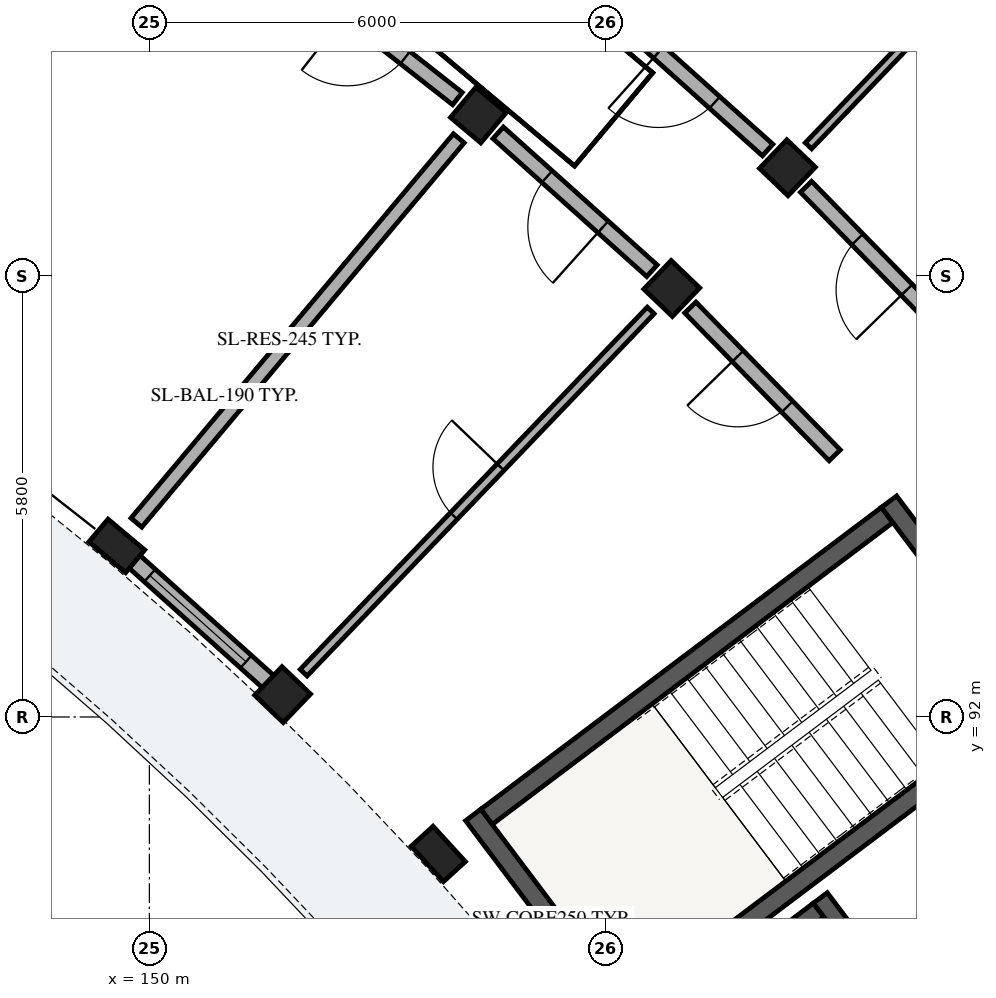
"""IFC4 building model, lengths in metres.
Left out: names, types, materials, properties, quantities, classifications, styles, units other than length and angle.
Written with IfcOpenShell. Run it as: python <this file> out.ifc"""

import sys

from ifc_helpers import new_model, si_unit, direction, frame, frame_2d, origin, origin_2d, place, context, subcontext, project, spatial, rectangle, extrude, element, fill, save


model = new_model("IFC4")
c1 = context("Model", 3, precision=1e-05, world=origin(), true_north=direction((0.0, 1.0)))
c2 = subcontext(c1, "Body", "Model", "MODEL_VIEW")
j1 = project(units=[si_unit("LENGTHUNIT", "METRE"), si_unit("PLANEANGLEUNIT", "RADIAN")], contexts=[c1])
p1 = place(None, origin())
s1 = spatial("IfcSite", under=j1, at=p1, CompositionType="ELEMENT")
p2 = place(p1, origin())
s2 = spatial("IfcBuilding", under=s1, at=p2, CompositionType="ELEMENT")
p3 = place(p2, frame((0.0, 0.0, 39.08)))
s3 = spatial("IfcBuildingStorey", under=s2, at=p3, CompositionType="ELEMENT", Elevation=39.08)
p4 = place(p3, frame((159.707, 94.658, 0.0), z_axis=(0.0, 0.0, 1.0), x_axis=(-0.798639633744, -0.601809550782, 0.0)))
e1 = element("IfcWall", 1, at=p4, inside=s3, PredefinedType="SHEAR", context=c2, shape_type="SweptSolid", body=[
    extrude(rectangle(XDim=6.6, YDim=0.25, at=frame_2d((3.3, 0.0))), origin(), (0.0, 0.0, 1.0), 3.11),
])
p5 = place(p3, frame((154.261, 90.711, 0.0), z_axis=(0.0, 0.0, 1.0), x_axis=(0.601825826579, -0.798627368967, 0.0)))
e2 = element("IfcWall", 2, at=p5, inside=s3, PredefinedType="SHEAR", context=c2, shape_type="SweptSolid", body=[
    extrude(rectangle(XDim=3.42, YDim=0.25, at=frame_2d((1.71, 0.0))), origin(), (0.0, 0.0, 1.0), 3.11),
])
p6 = place(p3, frame((159.731, 94.833, 0.0), z_axis=(0.0, 0.0, 1.0), x_axis=(0.601814606132, -0.798635824294, 0.0)))
e3 = element("IfcWall", 3, at=p6, inside=s3, PredefinedType="SHEAR", context=c2, shape_type="SweptSolid", body=[
    extrude(rectangle(XDim=3.42, YDim=0.25, at=frame_2d((1.71, 0.0))), origin(), (0.0, 0.0, 1.0), 3.11),
])
p7 = place(p3, frame((161.615, 92.126, 0.0), z_axis=(0.0, 0.0, 1.0), x_axis=(-0.798639633744, -0.601809550782, 0.0)))
e4 = element("IfcWall", 4, at=p7, inside=s3, PredefinedType="SHEAR", context=c2, shape_type="SweptSolid", body=[
    extrude(rectangle(XDim=6.6, YDim=0.25, at=frame_2d((3.3, 0.0))), origin(), (0.0, 0.0, 1.0), 3.11),
])
p8 = place(p7, frame((0.22, 0.0, 0.0)))
e5 = element("IfcOpeningElement", 5, at=p8, cuts=e4, PredefinedType="OPENING", context=c2, shape_type="SweptSolid", body=[
    extrude(rectangle(XDim=1.05, YDim=2.15, at=frame_2d((0.525, 1.075))), frame((0.0, 0.135, 0.0), z_axis=(0.0, -1.0, 0.0), x_axis=(1.0, 0.0, 0.0)), (0.0, 0.0, 1.0), 0.27),
])
p9 = place(p3, frame((158.827, 89.619, 0.0), z_axis=(0.0, 0.0, 1.0), x_axis=(0.601819781152, -0.798631924615, 0.0)))
e6 = element("IfcWall", 6, at=p9, inside=s3, PredefinedType="SHEAR", context=c2, shape_type="SweptSolid", body=[
    extrude(rectangle(XDim=3.26, YDim=0.23, at=frame_2d((1.63, 0.0))), origin(), (0.0, 0.0, 1.0), 3.11),
])
p10 = place(p9, frame((0.9, 0.0, 0.0)))
e7 = element("IfcOpeningElement", 7, at=p10, cuts=e6, PredefinedType="OPENING", context=c2, shape_type="SweptSolid", body=[
    extrude(rectangle(XDim=1.1, YDim=2.15, at=frame_2d((0.55, 1.075))), frame((0.0, 0.125, 0.0), z_axis=(0.0, -1.0, 0.0), x_axis=(1.0, 0.0, 0.0)), (0.0, 0.0, 1.0), 0.25),
])
p11 = place(p3, frame((158.805, 89.458, 0.0), z_axis=(0.0, 0.0, 1.0), x_axis=(-0.798608971494, -0.601850239387, 0.0)))
e8 = element("IfcWall", 8, at=p11, inside=s3, PredefinedType="SHEAR", context=c2, shape_type="SweptSolid", body=[
    extrude(rectangle(XDim=2.7, YDim=0.23, at=frame_2d((1.35, 0.0))), origin(), (0.0, 0.0, 1.0), 3.11),
])
p12 = place(p3, frame((153.801, 90.198, 0.0), z_axis=(0.0, 0.0, 1.0), x_axis=(0.73793204255, 0.674875025896, 0.0)))
e9 = element("IfcColumn", 9, at=p12, inside=s3, PredefinedType="PILASTER", context=c2, shape_type="SweptSolid", body=[
    extrude(rectangle(XDim=0.39, YDim=0.63, at=origin_2d()), origin(), (0.0, 0.0, 1.0), 3.12),
])
for number, where, z_axis, x_axis in (
    (10, (151.753, 92.294, 0.0), (0.0, 0.0, 1.0), (0.692, 0.722, 0.0)),
    (11, (156.873, 97.637, 0.0), (0.0, 0.0, 1.0), (0.692, 0.722, 0.0)),
    (12, (158.395, 99.226, 0.0), (0.0, 0.0, 1.0), (0.692, 0.722, 0.0)),
):
    element("IfcColumn", number, at=place(p3, frame(where, z_axis=z_axis, x_axis=x_axis)), inside=s3, PredefinedType="COLUMN", context=c2, shape_type="SweptSolid", body=[
        extrude(rectangle(XDim=0.52, YDim=0.52, at=origin_2d()), origin(), (0.0, 0.0, 1.0), 3.12),
    ])
p13 = place(p3, frame((149.572, 94.251, 0.0), z_axis=(0.0, 0.0, 1.0), x_axis=(0.642787582947, 0.766044465556, 0.0)))
e13 = element("IfcColumn", 13, at=p13, inside=s3, PredefinedType="PILASTER", context=c2, shape_type="SweptSolid", body=[
    extrude(rectangle(XDim=0.39, YDim=0.63, at=origin_2d()), origin(), (0.0, 0.0, 1.0), 3.12),
])
p14 = place(p3, frame((154.329, 99.919, 0.0), z_axis=(0.0, 0.0, 1.0), x_axis=(0.642787582947, 0.766044465556, 0.0)))
e14 = element("IfcColumn", 14, at=p14, inside=s3, PredefinedType="COLUMN", context=c2, shape_type="SweptSolid", body=[
    extrude(rectangle(XDim=0.52, YDim=0.52, at=origin_2d()), origin(), (0.0, 0.0, 1.0), 3.12),
])
p15 = place(p3, frame((151.582, 92.448, 0.0), z_axis=(0.0, 0.0, 1.0), x_axis=(-0.744394463736, 0.667740130859, 0.0)))
e15 = element("IfcWall", 15, at=p15, inside=s3, PredefinedType="SOLIDWALL", context=c2, shape_type="SweptSolid", body=[
    extrude(rectangle(XDim=2.535, YDim=0.22, at=frame_2d((1.268, 0.0))), origin(), (0.0, 0.0, 1.0), 2.355),
])
p16 = place(p15, frame((0.417, 0.0, 0.35)))
e16 = element("IfcOpeningElement", 16, at=p16, cuts=e15, PredefinedType="OPENING", context=c2, shape_type="SweptSolid", body=[
    extrude(rectangle(XDim=1.7, YDim=1.8, at=frame_2d((0.85, 0.9))), frame((0.0, 0.12, 0.0), z_axis=(0.0, -1.0, 0.0), x_axis=(1.0, 0.0, 0.0)), (0.0, 0.0, 1.0), 0.24),
])
p17 = place(p3, frame((160.641, 96.927, 0.0), z_axis=(0.0, 0.0, 1.0), x_axis=(-0.698787219683, 0.715329589496, 0.0)))
e17 = element("IfcWall", 17, at=p17, inside=s3, PredefinedType="PARTITIONING", context=c2, shape_type="SweptSolid", body=[
    extrude(rectangle(XDim=2.863, YDim=0.205, at=frame_2d((1.432, 0.0))), origin(), (0.0, 0.0, 1.0), 2.37),
])
p18 = place(p17, frame((0.967, 0.0, 0.0)))
e18 = element("IfcOpeningElement", 18, at=p18, cuts=e17, PredefinedType="OPENING", context=c2, shape_type="SweptSolid", body=[
    extrude(rectangle(XDim=0.93, YDim=2.12, at=frame_2d((0.465, 1.06))), frame((0.0, 0.113, 0.0), z_axis=(0.0, -1.0, 0.0), x_axis=(1.0, 0.0, 0.0)), (0.0, 0.0, 1.0), 0.225),
])
p19 = place(p3, frame((159.017, 95.443, 0.0), z_axis=(0.0, 0.0, 1.0), x_axis=(-0.698840007829, 0.715278018296, 0.0)))
e19 = element("IfcWall", 19, at=p19, inside=s3, PredefinedType="PARTITIONING", context=c2, shape_type="SweptSolid", body=[
    extrude(rectangle(XDim=2.718, YDim=0.205, at=frame_2d((1.359, 0.0))), origin(), (0.0, 0.0, 1.0), 2.37),
])
p20 = place(p19, frame((0.894, 0.0, 0.0)))
e20 = element("IfcOpeningElement", 20, at=p20, cuts=e19, PredefinedType="OPENING", context=c2, shape_type="SweptSolid", body=[
    extrude(rectangle(XDim=0.93, YDim=2.12, at=frame_2d((0.465, 1.06))), frame((0.0, 0.113, 0.0), z_axis=(0.0, -1.0, 0.0), x_axis=(1.0, 0.0, 0.0)), (0.0, 0.0, 1.0), 0.225),
])
p21 = place(p3, frame((158.672, 99.514, 0.0), z_axis=(0.0, 0.0, 1.0), x_axis=(0.691855720025, 0.722035776585, 0.0)))
e21 = element("IfcWall", 21, at=p21, inside=s3, PredefinedType="PARTITIONING", context=c2, shape_type="SweptSolid", body=[
    extrude(rectangle(XDim=4.7, YDim=0.115, at=frame_2d((2.35, 0.0))), origin(), (0.0, 0.0, 1.0), 2.37),
])
p22 = place(p21, frame((1.895, 0.0, 0.0)))
e22 = element("IfcOpeningElement", 22, at=p22, cuts=e21, PredefinedType="OPENING", context=c2, shape_type="SweptSolid", body=[
    extrude(rectangle(XDim=0.91, YDim=2.1, at=frame_2d((0.455, 1.05))), frame((0.0, 0.067, 0.0), z_axis=(0.0, -1.0, 0.0), x_axis=(1.0, 0.0, 0.0)), (0.0, 0.0, 1.0), 0.135),
])
p23 = place(p3, frame((152.03, 92.583, 0.0), z_axis=(0.0, 0.0, 1.0), x_axis=(0.691872422458, 0.722019771919, 0.0)))
e23 = element("IfcWall", 23, at=p23, inside=s3, PredefinedType="PARTITIONING", context=c2, shape_type="SweptSolid", body=[
    extrude(rectangle(XDim=6.6, YDim=0.125, at=frame_2d((3.3, 0.0))), origin(), (0.0, 0.0, 1.0), 2.37),
])
p24 = place(p23, frame((2.855, 0.0, 0.0)))
e24 = element("IfcOpeningElement", 24, at=p24, cuts=e23, PredefinedType="OPENING", context=c2, shape_type="SweptSolid", body=[
    extrude(rectangle(XDim=0.89, YDim=2.1, at=frame_2d((0.445, 1.05))), frame((0.0, 0.073, 0.0), z_axis=(0.0, -1.0, 0.0), x_axis=(1.0, 0.0, 0.0)), (0.0, 0.0, 1.0), 0.145),
])
p25 = place(p3, frame((158.135, 99.459, 0.0), z_axis=(0.0, 0.0, 1.0), x_axis=(-0.744433521088, 0.667696587291, 0.0)))
e25 = element("IfcWall", 25, at=p25, inside=s3, PredefinedType="PARTITIONING", context=c2, shape_type="SweptSolid", body=[
    extrude(rectangle(XDim=2.863, YDim=0.205, at=frame_2d((1.432, 0.0))), origin(), (0.0, 0.0, 1.0), 2.37),
])
p26 = place(p25, frame((0.937, 0.0, 0.0)))
e26 = element("IfcOpeningElement", 26, at=p26, cuts=e25, PredefinedType="OPENING", context=c2, shape_type="SweptSolid", body=[
    extrude(rectangle(XDim=0.99, YDim=2.16, at=frame_2d((0.495, 1.08))), frame((0.0, 0.113, 0.0), z_axis=(0.0, -1.0, 0.0), x_axis=(1.0, 0.0, 0.0)), (0.0, 0.0, 1.0), 0.225),
])
p27 = place(p3, frame((156.613, 97.871, 0.0), z_axis=(0.0, 0.0, 1.0), x_axis=(-0.744418559135, 0.667713268413, 0.0)))
e27 = element("IfcWall", 27, at=p27, inside=s3, PredefinedType="PARTITIONING", context=c2, shape_type="SweptSolid", body=[
    extrude(rectangle(XDim=2.718, YDim=0.205, at=frame_2d((1.359, 0.0))), origin(), (0.0, 0.0, 1.0), 2.37),
])
p28 = place(p27, frame((0.864, 0.0, 0.0)))
e28 = element("IfcOpeningElement", 28, at=p28, cuts=e27, PredefinedType="OPENING", context=c2, shape_type="SweptSolid", body=[
    extrude(rectangle(XDim=0.99, YDim=2.16, at=frame_2d((0.495, 1.08))), frame((0.0, 0.113, 0.0), z_axis=(0.0, -1.0, 0.0), x_axis=(1.0, 0.0, 0.0)), (0.0, 0.0, 1.0), 0.225),
])
p29 = place(p3, frame((149.829, 94.557, 0.0), z_axis=(0.0, 0.0, 1.0), x_axis=(0.642789470807, 0.766042881449, 0.0)))
e29 = element("IfcWall", 29, at=p29, inside=s3, PredefinedType="PARTITIONING", context=c2, shape_type="SweptSolid", body=[
    extrude(rectangle(XDim=6.6, YDim=0.185, at=frame_2d((3.3, 0.0))), origin(), (0.0, 0.0, 1.0), 2.37),
])
p30 = place(p3, frame((154.053, 100.135, 0.0), z_axis=(0.0, 0.0, 1.0), x_axis=(-0.786835457019, 0.617162833924, 0.0)))
e30 = element("IfcWall", 30, at=p30, inside=s3, PredefinedType="PARTITIONING", context=c2, shape_type="SweptSolid", body=[
    extrude(rectangle(XDim=2.718, YDim=0.205, at=frame_2d((1.359, 0.0))), origin(), (0.0, 0.0, 1.0), 2.37),
])
p31 = place(p30, frame((0.874, 0.0, 0.0)))
e31 = element("IfcOpeningElement", 31, at=p31, cuts=e30, PredefinedType="OPENING", context=c2, shape_type="SweptSolid", body=[
    extrude(rectangle(XDim=0.97, YDim=2.15, at=frame_2d((0.485, 1.075))), frame((0.0, 0.113, 0.0), z_axis=(0.0, -1.0, 0.0), x_axis=(1.0, 0.0, 0.0)), (0.0, 0.0, 1.0), 0.225),
])
p32 = place(p16, origin())
e32 = element("IfcWindow", 32, at=p32, inside=s3, PartitioningType="SINGLE_PANEL", PredefinedType="WINDOW", context=c2, shape_type="SweptSolid", body=[
    extrude(rectangle(XDim=1.7, YDim=1.8, at=frame_2d((0.85, 0.9))), frame((0.0, 0.03, 0.0), z_axis=(0.0, -1.0, 0.0), x_axis=(1.0, 0.0, 0.0)), (0.0, 0.0, 1.0), 0.06),
])
fill(e16, e32)
p33 = place(p18, origin())
e33 = element("IfcDoor", 33, at=p33, inside=s3, OperationType="SINGLE_SWING_LEFT", PredefinedType="DOOR", context=c2, shape_type="SweptSolid", body=[
    extrude(rectangle(XDim=0.93, YDim=2.12, at=frame_2d((0.465, 1.06))), frame((0.0, 0.025, 0.0), z_axis=(0.0, -1.0, 0.0), x_axis=(1.0, 0.0, 0.0)), (0.0, 0.0, 1.0), 0.05),
])
fill(e18, e33)
p34 = place(p20, origin())
e34 = element("IfcDoor", 34, at=p34, inside=s3, OperationType="SINGLE_SWING_RIGHT", PredefinedType="DOOR", context=c2, shape_type="SweptSolid", body=[
    extrude(rectangle(XDim=0.93, YDim=2.12, at=frame_2d((0.465, 1.06))), frame((0.0, 0.025, 0.0), z_axis=(0.0, -1.0, 0.0), x_axis=(1.0, 0.0, 0.0)), (0.0, 0.0, 1.0), 0.05),
])
fill(e20, e34)
p35 = place(p24, origin())
e35 = element("IfcDoor", 35, at=p35, inside=s3, OperationType="SINGLE_SWING_RIGHT", PredefinedType="DOOR", context=c2, shape_type="SweptSolid", body=[
    extrude(rectangle(XDim=0.89, YDim=2.1, at=frame_2d((0.445, 1.05))), frame((0.0, 0.025, 0.0), z_axis=(0.0, -1.0, 0.0), x_axis=(1.0, 0.0, 0.0)), (0.0, 0.0, 1.0), 0.05),
])
fill(e24, e35)
p36 = place(p26, origin())
e36 = element("IfcDoor", 36, at=p36, inside=s3, OperationType="SINGLE_SWING_RIGHT", PredefinedType="DOOR", context=c2, shape_type="SweptSolid", body=[
    extrude(rectangle(XDim=0.99, YDim=2.16, at=frame_2d((0.495, 1.08))), frame((0.0, 0.025, 0.0), z_axis=(0.0, -1.0, 0.0), x_axis=(1.0, 0.0, 0.0)), (0.0, 0.0, 1.0), 0.05),
])
fill(e26, e36)
p37 = place(p28, origin())
e37 = element("IfcDoor", 37, at=p37, inside=s3, OperationType="SINGLE_SWING_LEFT", PredefinedType="DOOR", context=c2, shape_type="SweptSolid", body=[
    extrude(rectangle(XDim=0.99, YDim=2.16, at=frame_2d((0.495, 1.08))), frame((0.0, 0.025, 0.0), z_axis=(0.0, -1.0, 0.0), x_axis=(1.0, 0.0, 0.0)), (0.0, 0.0, 1.0), 0.05),
])
fill(e28, e37)
p38 = place(p31, origin())
e38 = element("IfcDoor", 38, at=p38, inside=s3, OperationType="SINGLE_SWING_RIGHT", PredefinedType="DOOR", context=c2, shape_type="SweptSolid", body=[
    extrude(rectangle(XDim=0.97, YDim=2.15, at=frame_2d((0.485, 1.075))), frame((0.0, 0.025, 0.0), z_axis=(0.0, -1.0, 0.0), x_axis=(1.0, 0.0, 0.0)), (0.0, 0.0, 1.0), 0.05),
])
fill(e31, e38)
save(model, sys.argv[1])
